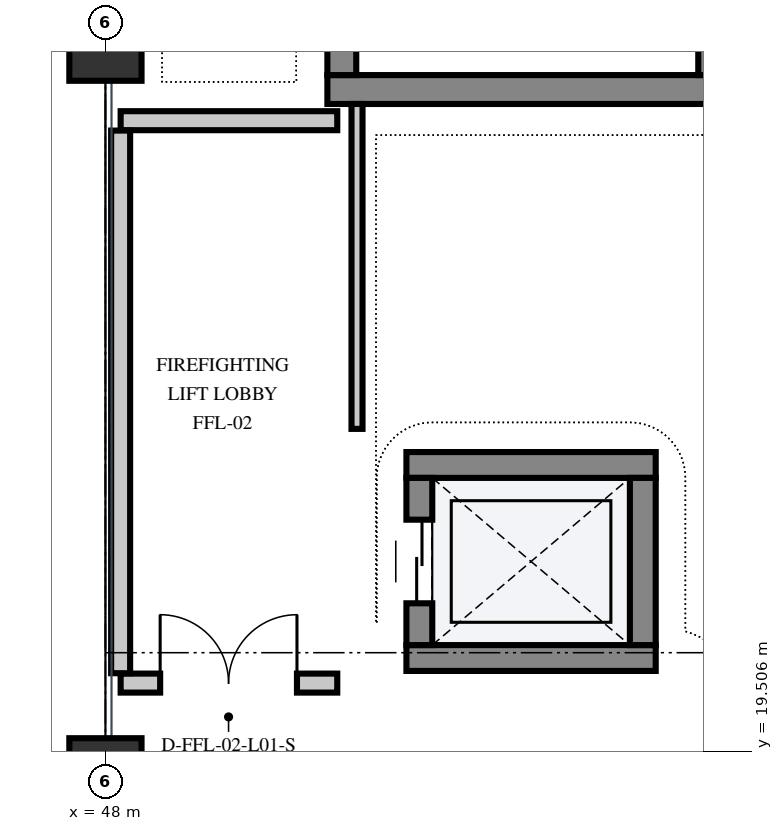
"""IFC4 building model, lengths in metres.
Left out: names, types, materials, properties, quantities, classifications, styles, units other than length and angle.
Written with IfcOpenShell. Run it as: python <this file> out.ifc"""

import sys

from ifc_helpers import new_model, si_unit, direction, frame, frame_2d, origin, origin_2d, place, context, subcontext, project, spatial, rectangle, extrude, element, fill, save


model = new_model("IFC4")
c1 = context("Model", 3, precision=1e-05, world=origin(), true_north=direction((0.0, 1.0)))
c2 = subcontext(c1, "Body", "Model", "MODEL_VIEW")
j1 = project(units=[si_unit("LENGTHUNIT", "METRE"), si_unit("PLANEANGLEUNIT", "RADIAN")], contexts=[c1])
p1 = place(None, origin())
s1 = spatial("IfcSite", under=j1, at=p1, CompositionType="ELEMENT")
p2 = place(p1, origin())
s2 = spatial("IfcBuilding", under=s1, at=p2, CompositionType="ELEMENT")
p3 = place(p2, frame((0.0, 0.0, 5.4)))
s3 = spatial("IfcBuildingStorey", under=s2, at=p3, CompositionType="ELEMENT", Elevation=5.4)
for number, where, z_axis, x_axis in (
    (1, (48.0, 19.2, 0.0), (0.0, 0.0, 1.0), (1.0, 0.0, 0.0)),
    (2, (48.0, 28.8, 0.0), (0.0, 0.0, 1.0), (1.0, 0.0, 0.0)),
):
    element("IfcColumn", number, at=place(p3, frame(where, z_axis=z_axis, x_axis=x_axis)), inside=s3, PredefinedType="COLUMN", context=c2, shape_type="SweptSolid", body=[
        extrude(rectangle(XDim=0.95, YDim=0.95, at=origin_2d()), origin(), (0.0, 0.0, 1.0), 4.8),
    ])
p4 = place(p3, frame((50.92, 28.21, 0.0), z_axis=(0.0, 0.0, 1.0), x_axis=(1.0, 0.0, 0.0)))
e3 = element("IfcWall", 3, at=p4, inside=s3, PredefinedType="SHEAR", context=c2, shape_type="SweptSolid", body=[
    extrude(rectangle(XDim=5.26, YDim=0.38, at=frame_2d((2.63, 0.0))), origin(), (0.0, 0.0, 1.0), 4.505),
])
p5 = place(p3, frame((55.99, 28.4, 0.0), z_axis=(0.0, 0.0, 1.0), x_axis=(0.0, 1.0, 0.0)))
e4 = element("IfcWall", 4, at=p5, inside=s3, PredefinedType="SHEAR", context=c2, shape_type="SweptSolid", body=[
    extrude(rectangle(XDim=8.8, YDim=0.38, at=frame_2d((4.4, 0.0))), origin(), (0.0, 0.0, 1.0), 4.505),
])
p6 = place(p3, frame((51.11, 28.4, 0.0), z_axis=(0.0, 0.0, 1.0), x_axis=(0.0, 1.0, 0.0)))
e5 = element("IfcWall", 5, at=p6, inside=s3, PredefinedType="SHEAR", context=c2, shape_type="SweptSolid", body=[
    extrude(rectangle(XDim=8.8, YDim=0.38, at=frame_2d((4.4, 0.0))), origin(), (0.0, 0.0, 1.0), 4.505),
])
p7 = place(p6, frame((0.45, 0.0, 0.0)))
e6 = element("IfcOpeningElement", 6, at=p7, cuts=e5, PredefinedType="OPENING", context=c2, shape_type="SweptSolid", body=[
    extrude(rectangle(XDim=1.35, YDim=2.2, at=frame_2d((0.675, 1.1))), frame((0.0, 0.202, 0.0), z_axis=(0.0, -1.0, 0.0), x_axis=(1.0, 0.0, 0.0)), (0.0, 0.0, 1.0), 0.404),
])
for number, where, z_axis, x_axis in (
    (7, (51.96, 20.73, 0.0), (0.0, 0.0, 1.0), (1.0, 0.0, 0.0)),
    (8, (51.96, 23.27, 0.0), (0.0, 0.0, 1.0), (1.0, 0.0, 0.0)),
):
    element("IfcWall", number, at=place(p3, frame(where, z_axis=z_axis, x_axis=x_axis)), inside=s3, PredefinedType="SHEAR", context=c2, shape_type="SweptSolid", body=[
        extrude(rectangle(XDim=3.28, YDim=0.34, at=frame_2d((1.64, 0.0))), origin(), (0.0, 0.0, 1.0), 4.505),
    ])
p8 = place(p3, frame((52.13, 20.9, 0.0), z_axis=(0.0, 0.0, 1.0), x_axis=(0.0, 1.0, 0.0)))
e9 = element("IfcWall", 9, at=p8, inside=s3, PredefinedType="SHEAR", context=c2, shape_type="SweptSolid", body=[
    extrude(rectangle(XDim=2.2, YDim=0.34, at=frame_2d((1.1, 0.0))), origin(), (0.0, 0.0, 1.0), 4.505),
])
p9 = place(p8, frame((0.55, 0.0, 0.0)))
e10 = element("IfcOpeningElement", 10, at=p9, cuts=e9, PredefinedType="OPENING", context=c2, shape_type="SweptSolid", body=[
    extrude(rectangle(XDim=1.1, YDim=2.15, at=frame_2d((0.55, 1.075))), frame((0.0, 0.182, 0.0), z_axis=(0.0, -1.0, 0.0), x_axis=(1.0, 0.0, 0.0)), (0.0, 0.0, 1.0), 0.364),
])
p10 = place(p3, frame((55.07, 20.9, 0.0), z_axis=(0.0, 0.0, 1.0), x_axis=(0.0, 1.0, 0.0)))
e11 = element("IfcWall", 11, at=p10, inside=s3, PredefinedType="SHEAR", context=c2, shape_type="SweptSolid", body=[
    extrude(rectangle(XDim=2.2, YDim=0.34, at=frame_2d((1.1, 0.0))), origin(), (0.0, 0.0, 1.0), 4.505),
])
p11 = place(p3, frame((48.2, 20.4, 0.0), z_axis=(0.0, 0.0, 1.0), x_axis=(1.0, 0.0, 0.0)))
e12 = element("IfcWall", 12, at=p11, inside=s3, PredefinedType="PARTITIONING", context=c2, shape_type="SweptSolid", body=[
    extrude(rectangle(XDim=2.85, YDim=0.25, at=frame_2d((1.425, 0.0))), origin(), (0.0, 0.0, 1.0), 3.445),
])
p12 = place(p11, frame((0.52, 0.0, 0.0)))
e13 = element("IfcOpeningElement", 13, at=p12, cuts=e12, PredefinedType="OPENING", context=c2, shape_type="SweptSolid", body=[
    extrude(rectangle(XDim=1.8, YDim=2.25, at=frame_2d((0.9, 1.125))), frame((0.0, 0.137, 0.0), z_axis=(0.0, -1.0, 0.0), x_axis=(1.0, 0.0, 0.0)), (0.0, 0.0, 1.0), 0.274),
])
p13 = place(p3, frame((48.2, 27.8, 0.0), z_axis=(0.0, 0.0, 1.0), x_axis=(1.0, 0.0, 0.0)))
e14 = element("IfcWall", 14, at=p13, inside=s3, PredefinedType="PARTITIONING", context=c2, shape_type="SweptSolid", body=[
    extrude(rectangle(XDim=2.85, YDim=0.25, at=frame_2d((1.425, 0.0))), origin(), (0.0, 0.0, 1.0), 3.445),
])
p14 = place(p3, frame((48.2, 20.53, 0.0), z_axis=(0.0, 0.0, 1.0), x_axis=(0.0, 1.0, 0.0)))
e15 = element("IfcWall", 15, at=p14, inside=s3, PredefinedType="PARTITIONING", context=c2, shape_type="SweptSolid", body=[
    extrude(rectangle(XDim=7.14, YDim=0.25, at=frame_2d((3.57, 0.0))), origin(), (0.0, 0.0, 1.0), 3.445),
])
p15 = place(p3, frame((51.31, 23.745, 0.0), z_axis=(0.0, 0.0, 1.0), x_axis=(0.0, 1.0, 0.0)))
e16 = element("IfcWall", 16, at=p15, inside=s3, PredefinedType="PARTITIONING", context=c2, shape_type="SweptSolid", body=[
    extrude(rectangle(XDim=4.275, YDim=0.145, at=frame_2d((2.138, 0.0))), origin(), (0.0, 0.0, 1.0), 4.505),
])
p16 = place(p9, origin())
e17 = element("IfcDoor", 17, at=p16, inside=s3, OperationType="DOUBLE_DOOR_SLIDING", PredefinedType="DOOR", context=c2, shape_type="SweptSolid", body=[
    extrude(rectangle(XDim=1.1, YDim=2.15, at=frame_2d((0.55, 1.075))), frame((0.0, 0.025, 0.0), z_axis=(0.0, -1.0, 0.0), x_axis=(1.0, 0.0, 0.0)), (0.0, 0.0, 1.0), 0.05),
])
fill(e10, e17)
p17 = place(p12, origin())
e18 = element("IfcDoor", 18, at=p17, inside=s3, OperationType="DOUBLE_DOOR_SINGLE_SWING", PredefinedType="DOOR", context=c2, shape_type="SweptSolid", body=[
    extrude(rectangle(XDim=1.8, YDim=2.25, at=frame_2d((0.9, 1.125))), frame((0.0, 0.025, 0.0), z_axis=(0.0, -1.0, 0.0), x_axis=(1.0, 0.0, 0.0)), (0.0, 0.0, 1.0), 0.05),
])
fill(e13, e18)
save(model, sys.argv[1])
